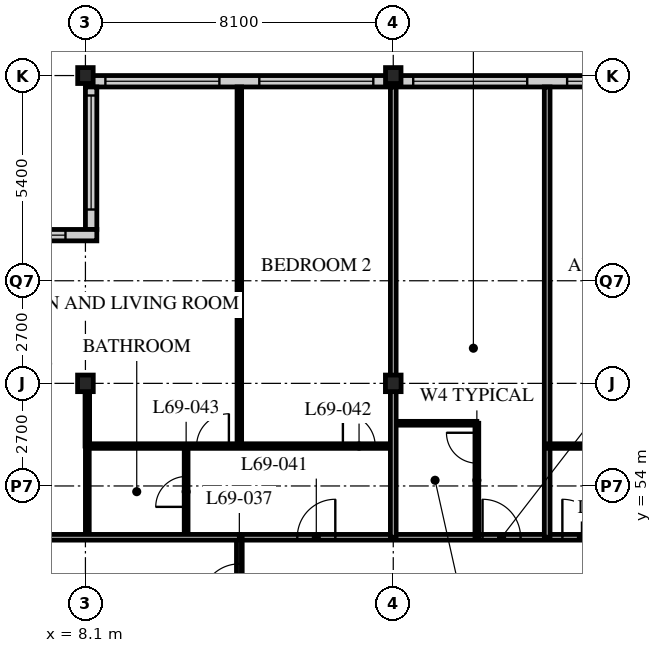
"""IFC4 building model, lengths in metres.
Left out: names, types, materials, properties, quantities, classifications, styles, units other than length and angle.
Written with IfcOpenShell. Run it as: python <this file> out.ifc"""

import sys

from ifc_helpers import new_model, si_unit, direction, frame, frame_2d, origin, origin_2d, place, context, subcontext, project, spatial, rectangle, i_section, extrude, element, fill, save


model = new_model("IFC4")
c1 = context("Model", 3, precision=1e-05, world=origin(), true_north=direction((0.0, 1.0)))
c2 = subcontext(c1, "Body", "Model", "MODEL_VIEW")
j1 = project(units=[si_unit("LENGTHUNIT", "METRE"), si_unit("PLANEANGLEUNIT", "RADIAN")], contexts=[c1])
p1 = place(None, origin())
s1 = spatial("IfcSite", under=j1, at=p1, CompositionType="ELEMENT")
p2 = place(p1, origin())
s2 = spatial("IfcBuilding", under=s1, at=p2, CompositionType="ELEMENT")
p3 = place(p2, frame((0.0, 0.0, 269.7)))
s3 = spatial("IfcBuildingStorey", under=s2, at=p3, CompositionType="ELEMENT", Elevation=269.7)
p4 = place(p3, frame((8.1, 56.7, 0.0), z_axis=(0.0, 0.0, 1.0), x_axis=(1.0, 0.0, 0.0)))
e1 = element("IfcColumn", 1, at=p4, inside=s3, PredefinedType="COLUMN", context=c2, shape_type="SweptSolid", body=[
    extrude(i_section(OverallWidth=0.412, OverallDepth=0.437, WebThickness=0.036, FlangeThickness=0.058, FilletRadius=0.015, at=origin_2d()), origin(), (0.0, 0.0, 1.0), 3.9),
])
p5 = place(p3, frame((8.1, 64.8, 0.0), z_axis=(0.0, 0.0, 1.0), x_axis=(1.0, 0.0, 0.0)))
e2 = element("IfcColumn", 2, at=p5, inside=s3, PredefinedType="COLUMN", context=c2, shape_type="SweptSolid", body=[
    extrude(i_section(OverallWidth=0.407, OverallDepth=0.419, WebThickness=0.031, FlangeThickness=0.049, FilletRadius=0.015, at=origin_2d()), origin(), (0.0, 0.0, 1.0), 3.9),
])
p6 = place(p3, frame((16.2, 56.7, 0.0), z_axis=(0.0, 0.0, 1.0), x_axis=(1.0, 0.0, 0.0)))
e3 = element("IfcColumn", 3, at=p6, inside=s3, PredefinedType="COLUMN", context=c2, shape_type="SweptSolid", body=[
    extrude(i_section(OverallWidth=0.412, OverallDepth=0.437, WebThickness=0.036, FlangeThickness=0.058, FilletRadius=0.015, at=origin_2d()), origin(), (0.0, 0.0, 1.0), 3.9),
])
p7 = place(p3, frame((16.2, 64.8, 0.0), z_axis=(0.0, 0.0, 1.0), x_axis=(1.0, 0.0, 0.0)))
e4 = element("IfcColumn", 4, at=p7, inside=s3, PredefinedType="COLUMN", context=c2, shape_type="SweptSolid", body=[
    extrude(i_section(OverallWidth=0.407, OverallDepth=0.419, WebThickness=0.031, FlangeThickness=0.049, FilletRadius=0.015, at=origin_2d()), origin(), (0.0, 0.0, 1.0), 3.9),
])
p8 = place(p3, frame((48.3, 64.65, 0.0), z_axis=(0.0, 0.0, 1.0), x_axis=(-1.0, 0.0, 0.0)))
e5 = element("IfcWall", 5, at=p8, inside=s3, PredefinedType="SOLIDWALL", context=c2, shape_type="SweptSolid", body=[
    extrude(rectangle(XDim=40.2, YDim=0.3, at=frame_2d((20.1, 0.0))), origin(), (0.0, 0.0, 1.0), 3.69),
])
p9 = place(p8, frame((0.225, 0.0, 0.6)))
e6 = element("IfcOpeningElement", 6, at=p9, cuts=e5, PredefinedType="OPENING", context=c2, shape_type="SweptSolid", body=[
    extrude(rectangle(XDim=3.0, YDim=2.4, at=frame_2d((1.5, 1.2))), frame((0.0, 0.16, 0.0), z_axis=(0.0, -1.0, 0.0), x_axis=(1.0, 0.0, 0.0)), (0.0, 0.0, 1.0), 0.32),
])
p10 = place(p8, frame((4.275, 0.0, 0.6)))
e7 = element("IfcOpeningElement", 7, at=p10, cuts=e5, PredefinedType="OPENING", context=c2, shape_type="SweptSolid", body=[
    extrude(rectangle(XDim=3.0, YDim=2.4, at=frame_2d((1.5, 1.2))), frame((0.0, 0.16, 0.0), z_axis=(0.0, -1.0, 0.0), x_axis=(1.0, 0.0, 0.0)), (0.0, 0.0, 1.0), 0.32),
])
p11 = place(p8, frame((8.325, 0.0, 0.6)))
e8 = element("IfcOpeningElement", 8, at=p11, cuts=e5, PredefinedType="OPENING", context=c2, shape_type="SweptSolid", body=[
    extrude(rectangle(XDim=3.0, YDim=2.4, at=frame_2d((1.5, 1.2))), frame((0.0, 0.16, 0.0), z_axis=(0.0, -1.0, 0.0), x_axis=(1.0, 0.0, 0.0)), (0.0, 0.0, 1.0), 0.32),
])
p12 = place(p8, frame((12.375, 0.0, 0.6)))
e9 = element("IfcOpeningElement", 9, at=p12, cuts=e5, PredefinedType="OPENING", context=c2, shape_type="SweptSolid", body=[
    extrude(rectangle(XDim=3.0, YDim=2.4, at=frame_2d((1.5, 1.2))), frame((0.0, 0.16, 0.0), z_axis=(0.0, -1.0, 0.0), x_axis=(1.0, 0.0, 0.0)), (0.0, 0.0, 1.0), 0.32),
])
p13 = place(p8, frame((16.425, 0.0, 0.6)))
e10 = element("IfcOpeningElement", 10, at=p13, cuts=e5, PredefinedType="OPENING", context=c2, shape_type="SweptSolid", body=[
    extrude(rectangle(XDim=3.0, YDim=2.4, at=frame_2d((1.5, 1.2))), frame((0.0, 0.16, 0.0), z_axis=(0.0, -1.0, 0.0), x_axis=(1.0, 0.0, 0.0)), (0.0, 0.0, 1.0), 0.32),
])
p14 = place(p8, frame((20.475, 0.0, 0.6)))
e11 = element("IfcOpeningElement", 11, at=p14, cuts=e5, PredefinedType="OPENING", context=c2, shape_type="SweptSolid", body=[
    extrude(rectangle(XDim=3.0, YDim=2.4, at=frame_2d((1.5, 1.2))), frame((0.0, 0.16, 0.0), z_axis=(0.0, -1.0, 0.0), x_axis=(1.0, 0.0, 0.0)), (0.0, 0.0, 1.0), 0.32),
])
p15 = place(p8, frame((24.525, 0.0, 0.6)))
e12 = element("IfcOpeningElement", 12, at=p15, cuts=e5, PredefinedType="OPENING", context=c2, shape_type="SweptSolid", body=[
    extrude(rectangle(XDim=3.0, YDim=2.4, at=frame_2d((1.5, 1.2))), frame((0.0, 0.16, 0.0), z_axis=(0.0, -1.0, 0.0), x_axis=(1.0, 0.0, 0.0)), (0.0, 0.0, 1.0), 0.32),
])
p16 = place(p8, frame((28.575, 0.0, 0.6)))
e13 = element("IfcOpeningElement", 13, at=p16, cuts=e5, PredefinedType="OPENING", context=c2, shape_type="SweptSolid", body=[
    extrude(rectangle(XDim=3.0, YDim=2.4, at=frame_2d((1.5, 1.2))), frame((0.0, 0.16, 0.0), z_axis=(0.0, -1.0, 0.0), x_axis=(1.0, 0.0, 0.0)), (0.0, 0.0, 1.0), 0.32),
])
p17 = place(p8, frame((32.625, 0.0, 0.6)))
e14 = element("IfcOpeningElement", 14, at=p17, cuts=e5, PredefinedType="OPENING", context=c2, shape_type="SweptSolid", body=[
    extrude(rectangle(XDim=3.0, YDim=2.4, at=frame_2d((1.5, 1.2))), frame((0.0, 0.16, 0.0), z_axis=(0.0, -1.0, 0.0), x_axis=(1.0, 0.0, 0.0)), (0.0, 0.0, 1.0), 0.32),
])
p18 = place(p8, frame((36.675, 0.0, 0.6)))
e15 = element("IfcOpeningElement", 15, at=p18, cuts=e5, PredefinedType="OPENING", context=c2, shape_type="SweptSolid", body=[
    extrude(rectangle(XDim=3.0, YDim=2.4, at=frame_2d((1.5, 1.2))), frame((0.0, 0.16, 0.0), z_axis=(0.0, -1.0, 0.0), x_axis=(1.0, 0.0, 0.0)), (0.0, 0.0, 1.0), 0.32),
])
p19 = place(p3, frame((8.25, 64.5, 0.0), z_axis=(0.0, 0.0, 1.0), x_axis=(0.0, -1.0, 0.0)))
e16 = element("IfcWall", 16, at=p19, inside=s3, PredefinedType="SOLIDWALL", context=c2, shape_type="SweptSolid", body=[
    extrude(rectangle(XDim=3.75, YDim=0.3, at=frame_2d((1.875, 0.0))), origin(), (0.0, 0.0, 1.0), 3.69),
])
p20 = place(p19, frame((0.225, 0.0, 0.6)))
e17 = element("IfcOpeningElement", 17, at=p20, cuts=e16, PredefinedType="OPENING", context=c2, shape_type="SweptSolid", body=[
    extrude(rectangle(XDim=3.0, YDim=2.3, at=frame_2d((1.5, 1.15))), frame((0.0, 0.16, 0.0), z_axis=(0.0, -1.0, 0.0), x_axis=(1.0, 0.0, 0.0)), (0.0, 0.0, 1.0), 0.32),
])
p21 = place(p3, frame((8.4, 60.6, 0.0), z_axis=(0.0, 0.0, 1.0), x_axis=(-1.0, 0.0, 0.0)))
e18 = element("IfcWall", 18, at=p21, inside=s3, PredefinedType="SOLIDWALL", context=c2, shape_type="SweptSolid", body=[
    extrude(rectangle(XDim=4.35, YDim=0.3, at=frame_2d((2.175, 0.0))), origin(), (0.0, 0.0, 1.0), 3.69),
])
p22 = place(p21, frame((0.825, 0.0, 0.6)))
e19 = element("IfcOpeningElement", 19, at=p22, cuts=e18, PredefinedType="OPENING", context=c2, shape_type="SweptSolid", body=[
    extrude(rectangle(XDim=3.0, YDim=2.3, at=frame_2d((1.5, 1.15))), frame((0.0, 0.16, 0.0), z_axis=(0.0, -1.0, 0.0), x_axis=(1.0, 0.0, 0.0)), (0.0, 0.0, 1.0), 0.32),
])
p23 = place(p3, frame((12.15, 52.65, 0.0), z_axis=(0.0, 0.0, 1.0), x_axis=(1.0, 0.0, 0.0)))
e20 = element("IfcWall", 20, at=p23, inside=s3, PredefinedType="PARTITIONING", context=c2, shape_type="SweptSolid", body=[
    extrude(rectangle(XDim=24.3, YDim=0.15, at=frame_2d((12.15, 0.0))), origin(), (0.0, 0.0, 1.0), 3.69),
])
p24 = place(p23, frame((6.4, 0.0, 0.0)))
e21 = element("IfcOpeningElement", 21, at=p24, cuts=e20, PredefinedType="OPENING", context=c2, shape_type="SweptSolid", body=[
    extrude(rectangle(XDim=1.0, YDim=2.1, at=frame_2d((0.5, 1.05))), frame((0.0, 0.085, 0.0), z_axis=(0.0, -1.0, 0.0), x_axis=(1.0, 0.0, 0.0)), (0.0, 0.0, 1.0), 0.17),
])
p25 = place(p23, frame((8.5, 0.0, 0.0)))
e22 = element("IfcOpeningElement", 22, at=p25, cuts=e20, PredefinedType="OPENING", context=c2, shape_type="SweptSolid", body=[
    extrude(rectangle(XDim=1.0, YDim=2.1, at=frame_2d((0.5, 1.05))), frame((0.0, 0.085, 0.0), z_axis=(0.0, -1.0, 0.0), x_axis=(1.0, 0.0, 0.0)), (0.0, 0.0, 1.0), 0.17),
])
p26 = place(p23, frame((16.6, 0.0, 0.0)))
e23 = element("IfcOpeningElement", 23, at=p26, cuts=e20, PredefinedType="OPENING", context=c2, shape_type="SweptSolid", body=[
    extrude(rectangle(XDim=1.0, YDim=2.1, at=frame_2d((0.5, 1.05))), frame((0.0, 0.085, 0.0), z_axis=(0.0, -1.0, 0.0), x_axis=(1.0, 0.0, 0.0)), (0.0, 0.0, 1.0), 0.17),
])
p27 = place(p23, frame((1.525, 0.0, 0.0)))
e24 = element("IfcOpeningElement", 24, at=p27, cuts=e20, PredefinedType="OPENING", context=c2, shape_type="SweptSolid", body=[
    extrude(rectangle(XDim=1.0, YDim=2.1, at=frame_2d((0.5, 1.05))), frame((0.0, 0.085, 0.0), z_axis=(0.0, -1.0, 0.0), x_axis=(1.0, 0.0, 0.0)), (0.0, 0.0, 1.0), 0.17),
])
p28 = place(p3, frame((12.15, 22.5, 0.0), z_axis=(0.0, 0.0, 1.0), x_axis=(0.0, 1.0, 0.0)))
e25 = element("IfcWall", 25, at=p28, inside=s3, PredefinedType="PARTITIONING", context=c2, shape_type="SweptSolid", body=[
    extrude(rectangle(XDim=30.15, YDim=0.15, at=frame_2d((15.075, 0.0))), origin(), (0.0, 0.0, 1.0), 3.69),
])
p29 = place(p28, frame((0.4, 0.0, 0.0)))
e26 = element("IfcOpeningElement", 26, at=p29, cuts=e25, PredefinedType="OPENING", context=c2, shape_type="SweptSolid", body=[
    extrude(rectangle(XDim=1.0, YDim=2.1, at=frame_2d((0.5, 1.05))), frame((0.0, 0.085, 0.0), z_axis=(0.0, -1.0, 0.0), x_axis=(1.0, 0.0, 0.0)), (0.0, 0.0, 1.0), 0.17),
])
p30 = place(p28, frame((18.4, 0.0, 0.0)))
e27 = element("IfcOpeningElement", 27, at=p30, cuts=e25, PredefinedType="OPENING", context=c2, shape_type="SweptSolid", body=[
    extrude(rectangle(XDim=1.0, YDim=2.1, at=frame_2d((0.5, 1.05))), frame((0.0, 0.085, 0.0), z_axis=(0.0, -1.0, 0.0), x_axis=(1.0, 0.0, 0.0)), (0.0, 0.0, 1.0), 0.17),
])
p31 = place(p28, frame((28.45, 0.0, 0.0)))
e28 = element("IfcOpeningElement", 28, at=p31, cuts=e25, PredefinedType="OPENING", context=c2, shape_type="SweptSolid", body=[
    extrude(rectangle(XDim=1.0, YDim=2.1, at=frame_2d((0.5, 1.05))), frame((0.0, 0.085, 0.0), z_axis=(0.0, -1.0, 0.0), x_axis=(1.0, 0.0, 0.0)), (0.0, 0.0, 1.0), 0.17),
])
p32 = place(p3, frame((16.2, 55.65, 0.0), z_axis=(0.0, 0.0, 1.0), x_axis=(1.0, 0.0, 0.0)))
e29 = element("IfcWall", 29, at=p32, inside=s3, PredefinedType="PARTITIONING", context=c2, shape_type="SweptSolid", body=[
    extrude(rectangle(XDim=2.2, YDim=0.1, at=frame_2d((1.1, 0.0))), origin(), (0.0, 0.0, 1.0), 3.69),
])
p33 = place(p3, frame((18.4, 52.65, 0.0), z_axis=(0.0, 0.0, 1.0), x_axis=(0.0, 1.0, 0.0)))
e30 = element("IfcWall", 30, at=p33, inside=s3, PredefinedType="PARTITIONING", context=c2, shape_type="SweptSolid", body=[
    extrude(rectangle(XDim=3.0, YDim=0.1, at=frame_2d((1.5, 0.0))), origin(), (0.0, 0.0, 1.0), 3.69),
])
p34 = place(p33, frame((1.95, 0.0, 0.0)))
e31 = element("IfcOpeningElement", 31, at=p34, cuts=e30, PredefinedType="OPENING", context=c2, shape_type="SweptSolid", body=[
    extrude(rectangle(XDim=0.8, YDim=2.1, at=frame_2d((0.4, 1.05))), frame((0.0, 0.06, 0.0), z_axis=(0.0, -1.0, 0.0), x_axis=(1.0, 0.0, 0.0)), (0.0, 0.0, 1.0), 0.12),
])
p35 = place(p3, frame((20.25, 52.65, 0.0), z_axis=(0.0, 0.0, 1.0), x_axis=(0.0, 1.0, 0.0)))
e32 = element("IfcWall", 32, at=p35, inside=s3, PredefinedType="PARTITIONING", context=c2, shape_type="SweptSolid", body=[
    extrude(rectangle(XDim=11.85, YDim=0.15, at=frame_2d((5.925, 0.0))), origin(), (0.0, 0.0, 1.0), 3.69),
])
p36 = place(p3, frame((20.25, 55.05, 0.0), z_axis=(0.0, 0.0, 1.0), x_axis=(1.0, 0.0, 0.0)))
e33 = element("IfcWall", 33, at=p36, inside=s3, PredefinedType="PARTITIONING", context=c2, shape_type="SweptSolid", body=[
    extrude(rectangle(XDim=16.2, YDim=0.12, at=frame_2d((8.1, 0.0))), origin(), (0.0, 0.0, 1.0), 3.69),
])
p37 = place(p36, frame((0.975, 0.0, 0.0)))
e34 = element("IfcOpeningElement", 34, at=p37, cuts=e33, PredefinedType="OPENING", context=c2, shape_type="SweptSolid", body=[
    extrude(rectangle(XDim=0.85, YDim=2.1, at=frame_2d((0.425, 1.05))), frame((0.0, 0.07, 0.0), z_axis=(0.0, -1.0, 0.0), x_axis=(1.0, 0.0, 0.0)), (0.0, 0.0, 1.0), 0.14),
])
p38 = place(p36, frame((4.375, 0.0, 0.0)))
e35 = element("IfcOpeningElement", 35, at=p38, cuts=e33, PredefinedType="OPENING", context=c2, shape_type="SweptSolid", body=[
    extrude(rectangle(XDim=0.85, YDim=2.1, at=frame_2d((0.425, 1.05))), frame((0.0, 0.07, 0.0), z_axis=(0.0, -1.0, 0.0), x_axis=(1.0, 0.0, 0.0)), (0.0, 0.0, 1.0), 0.14),
])
p39 = place(p36, frame((9.075, 0.0, 0.0)))
e36 = element("IfcOpeningElement", 36, at=p39, cuts=e33, PredefinedType="OPENING", context=c2, shape_type="SweptSolid", body=[
    extrude(rectangle(XDim=0.85, YDim=2.1, at=frame_2d((0.425, 1.05))), frame((0.0, 0.07, 0.0), z_axis=(0.0, -1.0, 0.0), x_axis=(1.0, 0.0, 0.0)), (0.0, 0.0, 1.0), 0.14),
])
p40 = place(p36, frame((12.475, 0.0, 0.0)))
e37 = element("IfcOpeningElement", 37, at=p40, cuts=e33, PredefinedType="OPENING", context=c2, shape_type="SweptSolid", body=[
    extrude(rectangle(XDim=0.85, YDim=2.1, at=frame_2d((0.425, 1.05))), frame((0.0, 0.07, 0.0), z_axis=(0.0, -1.0, 0.0), x_axis=(1.0, 0.0, 0.0)), (0.0, 0.0, 1.0), 0.14),
])
p41 = place(p3, frame((10.75, 52.65, 0.0), z_axis=(0.0, 0.0, 1.0), x_axis=(0.0, 1.0, 0.0)))
e38 = element("IfcWall", 38, at=p41, inside=s3, PredefinedType="PARTITIONING", context=c2, shape_type="SweptSolid", body=[
    extrude(rectangle(XDim=2.4, YDim=0.1, at=frame_2d((1.2, 0.0))), origin(), (0.0, 0.0, 1.0), 3.69),
])
p42 = place(p41, frame((0.8, 0.0, 0.0)))
e39 = element("IfcOpeningElement", 39, at=p42, cuts=e38, PredefinedType="OPENING", context=c2, shape_type="SweptSolid", body=[
    extrude(rectangle(XDim=0.8, YDim=2.1, at=frame_2d((0.4, 1.05))), frame((0.0, 0.06, 0.0), z_axis=(0.0, -1.0, 0.0), x_axis=(1.0, 0.0, 0.0)), (0.0, 0.0, 1.0), 0.12),
])
p43 = place(p3, frame((8.15, 52.65, 0.0), z_axis=(0.0, 0.0, 1.0), x_axis=(0.0, 1.0, 0.0)))
e40 = element("IfcWall", 40, at=p43, inside=s3, PredefinedType="PARTITIONING", context=c2, shape_type="SweptSolid", body=[
    extrude(rectangle(XDim=2.4, YDim=0.1, at=frame_2d((1.2, 0.0))), origin(), (0.0, 0.0, 1.0), 3.078),
])
p44 = place(p3, frame((8.15, 55.05, 0.0), z_axis=(0.0, 0.0, 1.0), x_axis=(1.0, 0.0, 0.0)))
e41 = element("IfcWall", 41, at=p44, inside=s3, PredefinedType="PARTITIONING", context=c2, shape_type="SweptSolid", body=[
    extrude(rectangle(XDim=8.05, YDim=0.12, at=frame_2d((4.025, 0.0))), origin(), (0.0, 0.0, 1.0), 3.69),
])
p45 = place(p44, frame((6.725, 0.0, 0.0)))
e42 = element("IfcOpeningElement", 42, at=p45, cuts=e41, PredefinedType="OPENING", context=c2, shape_type="SweptSolid", body=[
    extrude(rectangle(XDim=0.85, YDim=2.1, at=frame_2d((0.425, 1.05))), frame((0.0, 0.07, 0.0), z_axis=(0.0, -1.0, 0.0), x_axis=(1.0, 0.0, 0.0)), (0.0, 0.0, 1.0), 0.14),
])
p46 = place(p44, frame((2.875, 0.0, 0.0)))
e43 = element("IfcOpeningElement", 43, at=p46, cuts=e41, PredefinedType="OPENING", context=c2, shape_type="SweptSolid", body=[
    extrude(rectangle(XDim=0.85, YDim=2.1, at=frame_2d((0.425, 1.05))), frame((0.0, 0.07, 0.0), z_axis=(0.0, -1.0, 0.0), x_axis=(1.0, 0.0, 0.0)), (0.0, 0.0, 1.0), 0.14),
])
p47 = place(p3, frame((12.15, 55.05, 0.0), z_axis=(0.0, 0.0, 1.0), x_axis=(0.0, 1.0, 0.0)))
e44 = element("IfcWall", 44, at=p47, inside=s3, PredefinedType="PARTITIONING", context=c2, shape_type="SweptSolid", body=[
    extrude(rectangle(XDim=9.45, YDim=0.12, at=frame_2d((4.725, 0.0))), origin(), (0.0, 0.0, 1.0), 3.69),
])
p48 = place(p3, frame((0.3, 52.65, 0.0), z_axis=(0.0, 0.0, 1.0), x_axis=(1.0, 0.0, 0.0)))
e45 = element("IfcWall", 45, at=p48, inside=s3, PredefinedType="PARTITIONING", context=c2, shape_type="SweptSolid", body=[
    extrude(rectangle(XDim=11.85, YDim=0.15, at=frame_2d((5.925, 0.0))), origin(), (0.0, 0.0, 1.0), 3.69),
])
p49 = place(p3, frame((16.2, 52.65, 0.0), z_axis=(0.0, 0.0, 1.0), x_axis=(0.0, 1.0, 0.0)))
e46 = element("IfcWall", 46, at=p49, inside=s3, PredefinedType="PARTITIONING", context=c2, shape_type="SweptSolid", body=[
    extrude(rectangle(XDim=11.85, YDim=0.15, at=frame_2d((5.925, 0.0))), origin(), (0.0, 0.0, 1.0), 3.078),
])
p50 = place(p3, frame((8.15, 55.05, 0.0), z_axis=(0.0, 0.0, 1.0), x_axis=(0.0, 1.0, 0.0)))
e47 = element("IfcWall", 47, at=p50, inside=s3, PredefinedType="PARTITIONING", context=c2, shape_type="SweptSolid", body=[
    extrude(rectangle(XDim=1.447, YDim=0.12, at=frame_2d((0.724, 0.0))), origin(), (0.0, 0.0, 1.0), 3.078),
])
p51 = place(p15, origin())
e48 = element("IfcWindow", 48, at=p51, inside=s3, PartitioningType="SINGLE_PANEL", PredefinedType="WINDOW", context=c2, shape_type="SweptSolid", body=[
    extrude(rectangle(XDim=3.0, YDim=2.4, at=frame_2d((1.5, 1.2))), frame((0.0, 0.03, 0.0), z_axis=(0.0, -1.0, 0.0), x_axis=(1.0, 0.0, 0.0)), (0.0, 0.0, 1.0), 0.06),
])
fill(e12, e48)
p52 = place(p16, origin())
e49 = element("IfcWindow", 49, at=p52, inside=s3, PartitioningType="SINGLE_PANEL", PredefinedType="WINDOW", context=c2, shape_type="SweptSolid", body=[
    extrude(rectangle(XDim=3.0, YDim=2.4, at=frame_2d((1.5, 1.2))), frame((0.0, 0.03, 0.0), z_axis=(0.0, -1.0, 0.0), x_axis=(1.0, 0.0, 0.0)), (0.0, 0.0, 1.0), 0.06),
])
fill(e13, e49)
p53 = place(p17, origin())
e50 = element("IfcWindow", 50, at=p53, inside=s3, PartitioningType="SINGLE_PANEL", PredefinedType="WINDOW", context=c2, shape_type="SweptSolid", body=[
    extrude(rectangle(XDim=3.0, YDim=2.4, at=frame_2d((1.5, 1.2))), frame((0.0, 0.03, 0.0), z_axis=(0.0, -1.0, 0.0), x_axis=(1.0, 0.0, 0.0)), (0.0, 0.0, 1.0), 0.06),
])
fill(e14, e50)
p54 = place(p18, origin())
e51 = element("IfcWindow", 51, at=p54, inside=s3, PartitioningType="SINGLE_PANEL", PredefinedType="WINDOW", context=c2, shape_type="SweptSolid", body=[
    extrude(rectangle(XDim=3.0, YDim=2.4, at=frame_2d((1.5, 1.2))), frame((0.0, 0.03, 0.0), z_axis=(0.0, -1.0, 0.0), x_axis=(1.0, 0.0, 0.0)), (0.0, 0.0, 1.0), 0.06),
])
fill(e15, e51)
p55 = place(p20, origin())
e52 = element("IfcWindow", 52, at=p55, inside=s3, PartitioningType="SINGLE_PANEL", PredefinedType="WINDOW", context=c2, shape_type="SweptSolid", body=[
    extrude(rectangle(XDim=3.0, YDim=2.3, at=frame_2d((1.5, 1.15))), frame((0.0, 0.03, 0.0), z_axis=(0.0, -1.0, 0.0), x_axis=(1.0, 0.0, 0.0)), (0.0, 0.0, 1.0), 0.06),
])
fill(e17, e52)
p56 = place(p22, origin())
e53 = element("IfcWindow", 53, at=p56, inside=s3, PartitioningType="SINGLE_PANEL", PredefinedType="WINDOW", context=c2, shape_type="SweptSolid", body=[
    extrude(rectangle(XDim=3.0, YDim=2.3, at=frame_2d((1.5, 1.15))), frame((0.0, 0.03, 0.0), z_axis=(0.0, -1.0, 0.0), x_axis=(1.0, 0.0, 0.0)), (0.0, 0.0, 1.0), 0.06),
])
fill(e19, e53)
p57 = place(p34, origin())
e54 = element("IfcDoor", 54, at=p57, inside=s3, OperationType="SINGLE_SWING_RIGHT", PredefinedType="DOOR", context=c2, shape_type="SweptSolid", body=[
    extrude(rectangle(XDim=0.8, YDim=2.1, at=frame_2d((0.4, 1.05))), frame((0.0, 0.025, 0.0), z_axis=(0.0, -1.0, 0.0), x_axis=(1.0, 0.0, 0.0)), (0.0, 0.0, 1.0), 0.05),
])
fill(e31, e54)
p58 = place(p24, origin())
e55 = element("IfcDoor", 55, at=p58, inside=s3, OperationType="SINGLE_SWING_LEFT", PredefinedType="DOOR", context=c2, shape_type="SweptSolid", body=[
    extrude(rectangle(XDim=1.0, YDim=2.1, at=frame_2d((0.5, 1.05))), frame((0.0, 0.025, 0.0), z_axis=(0.0, -1.0, 0.0), x_axis=(1.0, 0.0, 0.0)), (0.0, 0.0, 1.0), 0.05),
])
fill(e21, e55)
p59 = place(p25, origin())
e56 = element("IfcDoor", 56, at=p59, inside=s3, OperationType="SINGLE_SWING_LEFT", PredefinedType="DOOR", context=c2, shape_type="SweptSolid", body=[
    extrude(rectangle(XDim=1.0, YDim=2.1, at=frame_2d((0.5, 1.05))), frame((0.0, 0.025, 0.0), z_axis=(0.0, -1.0, 0.0), x_axis=(1.0, 0.0, 0.0)), (0.0, 0.0, 1.0), 0.05),
])
fill(e22, e56)
p60 = place(p31, origin())
e57 = element("IfcDoor", 57, at=p60, inside=s3, OperationType="SINGLE_SWING_LEFT", PredefinedType="DOOR", context=c2, shape_type="SweptSolid", body=[
    extrude(rectangle(XDim=1.0, YDim=2.1, at=frame_2d((0.5, 1.05))), frame((0.0, 0.025, 0.0), z_axis=(0.0, -1.0, 0.0), x_axis=(1.0, 0.0, 0.0)), (0.0, 0.0, 1.0), 0.05),
])
fill(e28, e57)
p61 = place(p27, origin())
e58 = element("IfcDoor", 58, at=p61, inside=s3, OperationType="SINGLE_SWING_RIGHT", PredefinedType="DOOR", context=c2, shape_type="SweptSolid", body=[
    extrude(rectangle(XDim=1.0, YDim=2.1, at=frame_2d((0.5, 1.05))), frame((0.0, 0.025, 0.0), z_axis=(0.0, -1.0, 0.0), x_axis=(1.0, 0.0, 0.0)), (0.0, 0.0, 1.0), 0.05),
])
fill(e24, e58)
p62 = place(p45, origin())
e59 = element("IfcDoor", 59, at=p62, inside=s3, OperationType="SINGLE_SWING_LEFT", PredefinedType="DOOR", context=c2, shape_type="SweptSolid", body=[
    extrude(rectangle(XDim=0.85, YDim=2.1, at=frame_2d((0.425, 1.05))), frame((0.0, 0.025, 0.0), z_axis=(0.0, -1.0, 0.0), x_axis=(1.0, 0.0, 0.0)), (0.0, 0.0, 1.0), 0.05),
])
fill(e42, e59)
p63 = place(p42, origin())
e60 = element("IfcDoor", 60, at=p63, inside=s3, OperationType="SINGLE_SWING_LEFT", PredefinedType="DOOR", context=c2, shape_type="SweptSolid", body=[
    extrude(rectangle(XDim=0.8, YDim=2.1, at=frame_2d((0.4, 1.05))), frame((0.0, 0.025, 0.0), z_axis=(0.0, -1.0, 0.0), x_axis=(1.0, 0.0, 0.0)), (0.0, 0.0, 1.0), 0.05),
])
fill(e39, e60)
p64 = place(p46, origin())
e61 = element("IfcDoor", 61, at=p64, inside=s3, OperationType="SINGLE_SWING_RIGHT", PredefinedType="DOOR", context=c2, shape_type="SweptSolid", body=[
    extrude(rectangle(XDim=0.85, YDim=2.1, at=frame_2d((0.425, 1.05))), frame((0.0, 0.025, 0.0), z_axis=(0.0, -1.0, 0.0), x_axis=(1.0, 0.0, 0.0)), (0.0, 0.0, 1.0), 0.05),
])
fill(e43, e61)
save(model, sys.argv[1])
